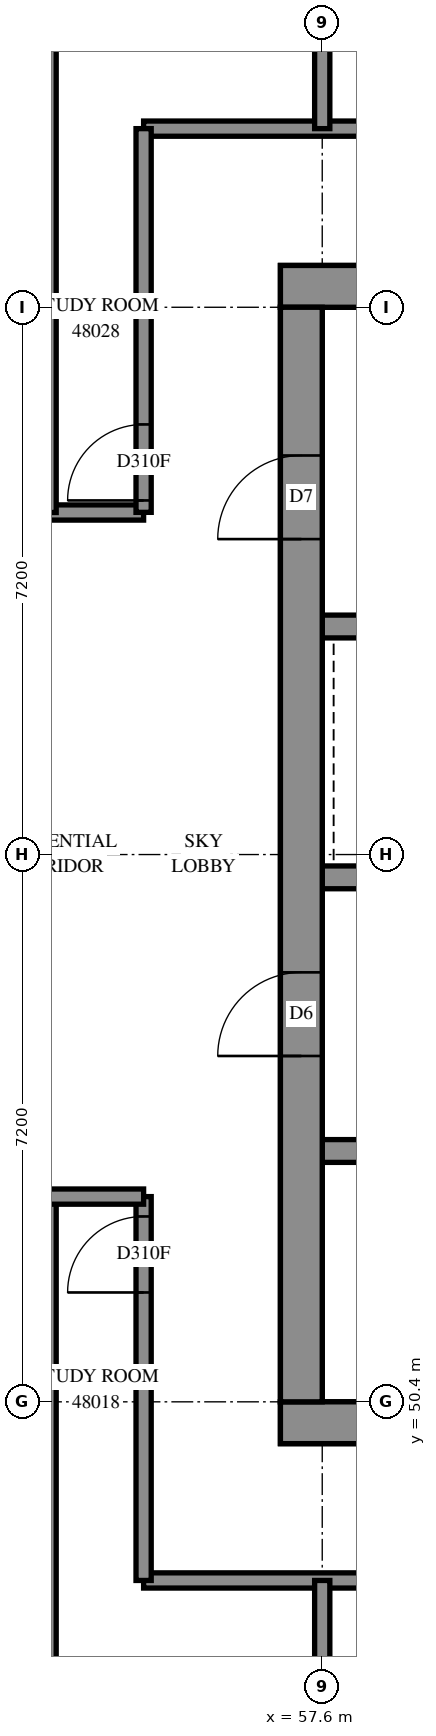
"""IFC4 building model, lengths in metres.
Left out: names, types, materials, properties, quantities, classifications, styles, units other than length and angle.
Written with IfcOpenShell. Run it as: python <this file> out.ifc"""

import sys

from ifc_helpers import new_model, si_unit, direction, frame, frame_2d, origin, place, context, subcontext, project, spatial, rectangle, extrude, element, fill, save


model = new_model("IFC4")
c1 = context("Model", 3, precision=1e-05, world=origin(), true_north=direction((0.0, 1.0)))
c2 = subcontext(c1, "Body", "Model", "MODEL_VIEW")
j1 = project(units=[si_unit("LENGTHUNIT", "METRE"), si_unit("PLANEANGLEUNIT", "RADIAN")], contexts=[c1])
p1 = place(None, origin())
s1 = spatial("IfcSite", under=j1, at=p1, CompositionType="ELEMENT")
p2 = place(p1, origin())
s2 = spatial("IfcBuilding", under=s1, at=p2, CompositionType="ELEMENT")
p3 = place(p2, frame((0.0, 0.0, 176.2)))
s3 = spatial("IfcBuildingStorey", under=s2, at=p3, CompositionType="ELEMENT", Elevation=176.2)
p4 = place(p3, frame((57.05, 50.125, -0.3), z_axis=(0.0, 0.0, 1.0), x_axis=(1.0, 0.0, 0.0)))
e1 = element("IfcWall", 1, at=p4, inside=s3, PredefinedType="SHEAR", context=c2, shape_type="SweptSolid", body=[
    extrude(rectangle(XDim=15.5, YDim=0.55, at=frame_2d((7.75, 0.0))), origin(), (0.0, 0.0, 1.0), 3.5),
])
p5 = place(p3, frame((57.05, 65.075, -0.3), z_axis=(0.0, 0.0, 1.0), x_axis=(1.0, 0.0, 0.0)))
e2 = element("IfcWall", 2, at=p5, inside=s3, PredefinedType="SHEAR", context=c2, shape_type="SweptSolid", body=[
    extrude(rectangle(XDim=15.5, YDim=0.55, at=frame_2d((7.75, 0.0))), origin(), (0.0, 0.0, 1.0), 3.5),
])
p6 = place(p5, frame((10.55, 0.0, 0.3)))
e3 = element("IfcOpeningElement", 3, at=p6, cuts=e2, PredefinedType="OPENING", context=c2, shape_type="SweptSolid", body=[
    extrude(rectangle(XDim=0.8, YDim=2.1, at=frame_2d((0.4, 1.05))), frame((0.0, 0.285, 0.0), z_axis=(0.0, -1.0, 0.0), x_axis=(1.0, 0.0, 0.0)), (0.0, 0.0, 1.0), 0.57),
])
p7 = place(p3, frame((57.325, 50.4, -0.3), z_axis=(0.0, 0.0, 1.0), x_axis=(0.0, 1.0, 0.0)))
e4 = element("IfcWall", 4, at=p7, inside=s3, PredefinedType="SHEAR", context=c2, shape_type="SweptSolid", body=[
    extrude(rectangle(XDim=14.4, YDim=0.55, at=frame_2d((7.2, 0.0))), origin(), (0.0, 0.0, 1.0), 3.5),
])
p8 = place(p7, frame((4.55, 0.0, 0.3)))
e5 = element("IfcOpeningElement", 5, at=p8, cuts=e4, PredefinedType="OPENING", context=c2, shape_type="SweptSolid", body=[
    extrude(rectangle(XDim=1.1, YDim=2.1, at=frame_2d((0.55, 1.05))), frame((0.0, 0.285, 0.0), z_axis=(0.0, -1.0, 0.0), x_axis=(1.0, 0.0, 0.0)), (0.0, 0.0, 1.0), 0.57),
])
p9 = place(p7, frame((11.35, 0.0, 0.3)))
e6 = element("IfcOpeningElement", 6, at=p9, cuts=e4, PredefinedType="OPENING", context=c2, shape_type="SweptSolid", body=[
    extrude(rectangle(XDim=1.1, YDim=2.1, at=frame_2d((0.55, 1.05))), frame((0.0, 0.285, 0.0), z_axis=(0.0, -1.0, 0.0), x_axis=(1.0, 0.0, 0.0)), (0.0, 0.0, 1.0), 0.57),
])
p10 = place(p3, frame((57.6, 53.7, 0.0), z_axis=(0.0, 0.0, 1.0), x_axis=(1.0, 0.0, 0.0)))
e7 = element("IfcWall", 7, at=p10, inside=s3, PredefinedType="SOLIDWALL", context=c2, shape_type="SweptSolid", body=[
    extrude(rectangle(XDim=14.4, YDim=0.3, at=frame_2d((7.2, 0.0))), origin(), (0.0, 0.0, 1.0), 3.9),
])
p11 = place(p10, frame((1.35, 0.0, 0.0)))
e8 = element("IfcOpeningElement", 8, at=p11, cuts=e7, PredefinedType="OPENING", context=c2, shape_type="SweptSolid", body=[
    extrude(rectangle(XDim=0.9, YDim=2.1, at=frame_2d((0.45, 1.05))), frame((0.0, 0.16, 0.0), z_axis=(0.0, -1.0, 0.0), x_axis=(1.0, 0.0, 0.0)), (0.0, 0.0, 1.0), 0.32),
])
p12 = place(p10, frame((4.95, 0.0, 0.0)))
e9 = element("IfcOpeningElement", 9, at=p12, cuts=e7, PredefinedType="OPENING", context=c2, shape_type="SweptSolid", body=[
    extrude(rectangle(XDim=0.9, YDim=2.1, at=frame_2d((0.45, 1.05))), frame((0.0, 0.16, 0.0), z_axis=(0.0, -1.0, 0.0), x_axis=(1.0, 0.0, 0.0)), (0.0, 0.0, 1.0), 0.32),
])
p13 = place(p10, frame((8.55, 0.0, 0.0)))
e10 = element("IfcOpeningElement", 10, at=p13, cuts=e7, PredefinedType="OPENING", context=c2, shape_type="SweptSolid", body=[
    extrude(rectangle(XDim=0.9, YDim=2.1, at=frame_2d((0.45, 1.05))), frame((0.0, 0.16, 0.0), z_axis=(0.0, -1.0, 0.0), x_axis=(1.0, 0.0, 0.0)), (0.0, 0.0, 1.0), 0.32),
])
p14 = place(p10, frame((12.05, 0.0, 0.0)))
e11 = element("IfcOpeningElement", 11, at=p14, cuts=e7, PredefinedType="OPENING", context=c2, shape_type="SweptSolid", body=[
    extrude(rectangle(XDim=1.1, YDim=2.1, at=frame_2d((0.55, 1.05))), frame((0.0, 0.16, 0.0), z_axis=(0.0, -1.0, 0.0), x_axis=(1.0, 0.0, 0.0)), (0.0, 0.0, 1.0), 0.32),
])
p15 = place(p3, frame((57.6, 57.3, 0.0), z_axis=(0.0, 0.0, 1.0), x_axis=(1.0, 0.0, 0.0)))
e12 = element("IfcWall", 12, at=p15, inside=s3, PredefinedType="SOLIDWALL", context=c2, shape_type="SweptSolid", body=[
    extrude(rectangle(XDim=14.4, YDim=0.3, at=frame_2d((7.2, 0.0))), origin(), (0.0, 0.0, 1.0), 3.9),
])
p16 = place(p15, frame((1.25, 0.0, 0.0)))
e13 = element("IfcOpeningElement", 13, at=p16, cuts=e12, PredefinedType="OPENING", context=c2, shape_type="SweptSolid", body=[
    extrude(rectangle(XDim=1.1, YDim=2.1, at=frame_2d((0.55, 1.05))), frame((0.0, 0.16, 0.0), z_axis=(0.0, -1.0, 0.0), x_axis=(1.0, 0.0, 0.0)), (0.0, 0.0, 1.0), 0.32),
])
p17 = place(p15, frame((4.85, 0.0, 0.0)))
e14 = element("IfcOpeningElement", 14, at=p17, cuts=e12, PredefinedType="OPENING", context=c2, shape_type="SweptSolid", body=[
    extrude(rectangle(XDim=1.1, YDim=2.1, at=frame_2d((0.55, 1.05))), frame((0.0, 0.16, 0.0), z_axis=(0.0, -1.0, 0.0), x_axis=(1.0, 0.0, 0.0)), (0.0, 0.0, 1.0), 0.32),
])
p18 = place(p15, frame((8.45, 0.0, 0.0)))
e15 = element("IfcOpeningElement", 15, at=p18, cuts=e12, PredefinedType="OPENING", context=c2, shape_type="SweptSolid", body=[
    extrude(rectangle(XDim=1.1, YDim=2.1, at=frame_2d((0.55, 1.05))), frame((0.0, 0.16, 0.0), z_axis=(0.0, -1.0, 0.0), x_axis=(1.0, 0.0, 0.0)), (0.0, 0.0, 1.0), 0.32),
])
p19 = place(p15, frame((12.05, 0.0, 0.0)))
e16 = element("IfcOpeningElement", 16, at=p19, cuts=e12, PredefinedType="OPENING", context=c2, shape_type="SweptSolid", body=[
    extrude(rectangle(XDim=1.1, YDim=2.1, at=frame_2d((0.55, 1.05))), frame((0.0, 0.16, 0.0), z_axis=(0.0, -1.0, 0.0), x_axis=(1.0, 0.0, 0.0)), (0.0, 0.0, 1.0), 0.32),
])
p20 = place(p3, frame((57.6, 60.6, 0.0), z_axis=(0.0, 0.0, 1.0), x_axis=(1.0, 0.0, 0.0)))
e17 = element("IfcWall", 17, at=p20, inside=s3, PredefinedType="SOLIDWALL", context=c2, shape_type="SweptSolid", body=[
    extrude(rectangle(XDim=7.2, YDim=0.3, at=frame_2d((3.6, 0.0))), origin(), (0.0, 0.0, 1.0), 3.9),
])
p21 = place(p3, frame((55.25, 48.05, 0.0), z_axis=(0.0, 0.0, 1.0), x_axis=(1.0, 0.0, 0.0)))
e18 = element("IfcWall", 18, at=p21, inside=s3, PredefinedType="PARTITIONING", context=c2, shape_type="SweptSolid", body=[
    extrude(rectangle(XDim=19.12, YDim=0.2, at=frame_2d((9.56, 0.0))), origin(), (0.0, 0.0, 1.0), 3.9),
])
p22 = place(p21, frame((4.383, 0.0, 0.0)))
e19 = element("IfcOpeningElement", 19, at=p22, cuts=e18, PredefinedType="OPENING", context=c2, shape_type="SweptSolid", body=[
    extrude(rectangle(XDim=1.0, YDim=2.1, at=frame_2d((0.5, 1.05))), frame((0.0, 0.11, 0.0), z_axis=(0.0, -1.0, 0.0), x_axis=(1.0, 0.0, 0.0)), (0.0, 0.0, 1.0), 0.22),
])
p23 = place(p21, frame((6.457, 0.0, 0.0)))
e20 = element("IfcOpeningElement", 20, at=p23, cuts=e18, PredefinedType="OPENING", context=c2, shape_type="SweptSolid", body=[
    extrude(rectangle(XDim=1.0, YDim=2.1, at=frame_2d((0.5, 1.05))), frame((0.0, 0.11, 0.0), z_axis=(0.0, -1.0, 0.0), x_axis=(1.0, 0.0, 0.0)), (0.0, 0.0, 1.0), 0.22),
])
p24 = place(p21, frame((11.582, 0.0, 0.0)))
e21 = element("IfcOpeningElement", 21, at=p24, cuts=e18, PredefinedType="OPENING", context=c2, shape_type="SweptSolid", body=[
    extrude(rectangle(XDim=1.0, YDim=2.1, at=frame_2d((0.5, 1.05))), frame((0.0, 0.11, 0.0), z_axis=(0.0, -1.0, 0.0), x_axis=(1.0, 0.0, 0.0)), (0.0, 0.0, 1.0), 0.22),
])
p25 = place(p21, frame((13.658, 0.0, 0.0)))
e22 = element("IfcOpeningElement", 22, at=p25, cuts=e18, PredefinedType="OPENING", context=c2, shape_type="SweptSolid", body=[
    extrude(rectangle(XDim=1.0, YDim=2.1, at=frame_2d((0.5, 1.05))), frame((0.0, 0.11, 0.0), z_axis=(0.0, -1.0, 0.0), x_axis=(1.0, 0.0, 0.0)), (0.0, 0.0, 1.0), 0.22),
])
p26 = place(p3, frame((55.25, 67.15, 0.0), z_axis=(0.0, 0.0, 1.0), x_axis=(1.0, 0.0, 0.0)))
e23 = element("IfcWall", 23, at=p26, inside=s3, PredefinedType="PARTITIONING", context=c2, shape_type="SweptSolid", body=[
    extrude(rectangle(XDim=19.1, YDim=0.2, at=frame_2d((9.55, 0.0))), origin(), (0.0, 0.0, 1.0), 3.9),
])
p27 = place(p26, frame((4.442, 0.0, 0.0)))
e24 = element("IfcOpeningElement", 24, at=p27, cuts=e23, PredefinedType="OPENING", context=c2, shape_type="SweptSolid", body=[
    extrude(rectangle(XDim=1.0, YDim=2.1, at=frame_2d((0.5, 1.05))), frame((0.0, 0.11, 0.0), z_axis=(0.0, -1.0, 0.0), x_axis=(1.0, 0.0, 0.0)), (0.0, 0.0, 1.0), 0.22),
])
p28 = place(p26, frame((6.518, 0.0, 0.0)))
e25 = element("IfcOpeningElement", 25, at=p28, cuts=e23, PredefinedType="OPENING", context=c2, shape_type="SweptSolid", body=[
    extrude(rectangle(XDim=1.0, YDim=2.1, at=frame_2d((0.5, 1.05))), frame((0.0, 0.11, 0.0), z_axis=(0.0, -1.0, 0.0), x_axis=(1.0, 0.0, 0.0)), (0.0, 0.0, 1.0), 0.22),
])
p29 = place(p26, frame((11.643, 0.0, 0.0)))
e26 = element("IfcOpeningElement", 26, at=p29, cuts=e23, PredefinedType="OPENING", context=c2, shape_type="SweptSolid", body=[
    extrude(rectangle(XDim=1.0, YDim=2.1, at=frame_2d((0.5, 1.05))), frame((0.0, 0.11, 0.0), z_axis=(0.0, -1.0, 0.0), x_axis=(1.0, 0.0, 0.0)), (0.0, 0.0, 1.0), 0.22),
])
p30 = place(p26, frame((13.717, 0.0, 0.0)))
e27 = element("IfcOpeningElement", 27, at=p30, cuts=e23, PredefinedType="OPENING", context=c2, shape_type="SweptSolid", body=[
    extrude(rectangle(XDim=1.0, YDim=2.1, at=frame_2d((0.5, 1.05))), frame((0.0, 0.11, 0.0), z_axis=(0.0, -1.0, 0.0), x_axis=(1.0, 0.0, 0.0)), (0.0, 0.0, 1.0), 0.22),
])
p31 = place(p3, frame((40.502, 62.1, 0.0), z_axis=(0.0, 0.0, 1.0), x_axis=(1.0, 0.0, 0.0)))
e28 = element("IfcWall", 28, at=p31, inside=s3, PredefinedType="PARTITIONING", context=c2, shape_type="SweptSolid", body=[
    extrude(rectangle(XDim=14.748, YDim=0.2, at=frame_2d((7.374, 0.0))), origin(), (0.0, 0.0, 1.0), 3.9),
])
p32 = place(p31, frame((0.265, 0.0, 0.0)))
e29 = element("IfcOpeningElement", 29, at=p32, cuts=e28, PredefinedType="OPENING", context=c2, shape_type="SweptSolid", body=[
    extrude(rectangle(XDim=1.0, YDim=2.1, at=frame_2d((0.5, 1.05))), frame((0.0, 0.11, 0.0), z_axis=(0.0, -1.0, 0.0), x_axis=(1.0, 0.0, 0.0)), (0.0, 0.0, 1.0), 0.22),
])
p33 = place(p31, frame((6.561, 0.0, 0.0)))
e30 = element("IfcOpeningElement", 30, at=p33, cuts=e28, PredefinedType="OPENING", context=c2, shape_type="SweptSolid", body=[
    extrude(rectangle(XDim=1.0, YDim=2.1, at=frame_2d((0.5, 1.05))), frame((0.0, 0.11, 0.0), z_axis=(0.0, -1.0, 0.0), x_axis=(1.0, 0.0, 0.0)), (0.0, 0.0, 1.0), 0.22),
])
p34 = place(p31, frame((11.991, 0.0, 0.0)))
e31 = element("IfcOpeningElement", 31, at=p34, cuts=e28, PredefinedType="OPENING", context=c2, shape_type="SweptSolid", body=[
    extrude(rectangle(XDim=1.0, YDim=2.1, at=frame_2d((0.5, 1.05))), frame((0.0, 0.11, 0.0), z_axis=(0.0, -1.0, 0.0), x_axis=(1.0, 0.0, 0.0)), (0.0, 0.0, 1.0), 0.22),
])
for number, where, z_axis, x_axis in (
    (32, (54.0, 45.13, 0.0), (0.0, 0.0, 1.0), (0.0, 1.0, 0.0)),
    (33, (54.0, 62.1, 0.0), (0.0, 0.0, 1.0), (0.0, 1.0, 0.0)),
):
    element("IfcWall", number, at=place(p3, frame(where, z_axis=z_axis, x_axis=x_axis)), inside=s3, PredefinedType="PARTITIONING", context=c2, shape_type="SweptSolid", body=[
        extrude(rectangle(XDim=7.97, YDim=0.2, at=frame_2d((3.985, 0.0))), origin(), (0.0, 0.0, 1.0), 3.9),
    ])
p35 = place(p3, frame((55.25, 48.05, 0.0), z_axis=(0.0, 0.0, 1.0), x_axis=(0.0, 1.0, 0.0)))
e34 = element("IfcWall", 34, at=p35, inside=s3, PredefinedType="PARTITIONING", context=c2, shape_type="SweptSolid", body=[
    extrude(rectangle(XDim=5.05, YDim=0.2, at=frame_2d((2.525, 0.0))), origin(), (0.0, 0.0, 1.0), 3.9),
])
p36 = place(p35, frame((3.789, 0.0, 0.0)))
e35 = element("IfcOpeningElement", 35, at=p36, cuts=e34, PredefinedType="OPENING", context=c2, shape_type="SweptSolid", body=[
    extrude(rectangle(XDim=1.0, YDim=2.1, at=frame_2d((0.5, 1.05))), frame((0.0, 0.11, 0.0), z_axis=(0.0, -1.0, 0.0), x_axis=(1.0, 0.0, 0.0)), (0.0, 0.0, 1.0), 0.22),
])
p37 = place(p3, frame((55.25, 62.102, 0.0), z_axis=(0.0, 0.0, 1.0), x_axis=(0.0, 1.0, 0.0)))
e36 = element("IfcWall", 36, at=p37, inside=s3, PredefinedType="PARTITIONING", context=c2, shape_type="SweptSolid", body=[
    extrude(rectangle(XDim=5.048, YDim=0.2, at=frame_2d((2.524, 0.0))), origin(), (0.0, 0.0, 1.0), 3.9),
])
p38 = place(p37, frame((0.157, 0.0, 0.0)))
e37 = element("IfcOpeningElement", 37, at=p38, cuts=e36, PredefinedType="OPENING", context=c2, shape_type="SweptSolid", body=[
    extrude(rectangle(XDim=1.0, YDim=2.1, at=frame_2d((0.5, 1.05))), frame((0.0, 0.11, 0.0), z_axis=(0.0, -1.0, 0.0), x_axis=(1.0, 0.0, 0.0)), (0.0, 0.0, 1.0), 0.22),
])
p39 = place(p3, frame((50.4, 53.1, 0.0), z_axis=(0.0, 0.0, 1.0), x_axis=(1.0, 0.0, 0.0)))
e38 = element("IfcWall", 38, at=p39, inside=s3, PredefinedType="PARTITIONING", context=c2, shape_type="SweptSolid", body=[
    extrude(rectangle(XDim=4.85, YDim=0.2, at=frame_2d((2.425, 0.0))), origin(), (0.0, 0.0, 1.0), 3.9),
])
p40 = place(p39, frame((2.033, 0.0, 0.0)))
e39 = element("IfcOpeningElement", 39, at=p40, cuts=e38, PredefinedType="OPENING", context=c2, shape_type="SweptSolid", body=[
    extrude(rectangle(XDim=1.0, YDim=2.1, at=frame_2d((0.5, 1.05))), frame((0.0, 0.11, 0.0), z_axis=(0.0, -1.0, 0.0), x_axis=(1.0, 0.0, 0.0)), (0.0, 0.0, 1.0), 0.22),
])
for number, where, z_axis, x_axis in (
    (40, (57.6, 45.13, 0.0), (0.0, 0.0, 1.0), (0.0, 1.0, 0.0)),
    (41, (57.6, 67.15, 0.0), (0.0, 0.0, 1.0), (0.0, 1.0, 0.0)),
):
    element("IfcWall", number, at=place(p3, frame(where, z_axis=z_axis, x_axis=x_axis)), inside=s3, PredefinedType="PARTITIONING", context=c2, shape_type="SweptSolid", body=[
        extrude(rectangle(XDim=2.92, YDim=0.2, at=frame_2d((1.46, 0.0))), origin(), (0.0, 0.0, 1.0), 3.9),
    ])
p41 = place(p8, origin())
e42 = element("IfcDoor", 42, at=p41, inside=s3, OperationType="DOUBLE_DOOR_SINGLE_SWING", PredefinedType="DOOR", context=c2, shape_type="SweptSolid", body=[
    extrude(rectangle(XDim=1.1, YDim=2.1, at=frame_2d((0.55, 1.05))), frame((0.0, 0.025, 0.0), z_axis=(0.0, -1.0, 0.0), x_axis=(1.0, 0.0, 0.0)), (0.0, 0.0, 1.0), 0.05),
])
fill(e5, e42)
p42 = place(p9, origin())
e43 = element("IfcDoor", 43, at=p42, inside=s3, OperationType="SINGLE_SWING_LEFT", PredefinedType="DOOR", context=c2, shape_type="SweptSolid", body=[
    extrude(rectangle(XDim=1.1, YDim=2.1, at=frame_2d((0.55, 1.05))), frame((0.0, 0.025, 0.0), z_axis=(0.0, -1.0, 0.0), x_axis=(1.0, 0.0, 0.0)), (0.0, 0.0, 1.0), 0.05),
])
fill(e6, e43)
p43 = place(p36, origin())
e44 = element("IfcDoor", 44, at=p43, inside=s3, OperationType="SINGLE_SWING_RIGHT", PredefinedType="DOOR", context=c2, shape_type="SweptSolid", body=[
    extrude(rectangle(XDim=1.0, YDim=2.1, at=frame_2d((0.5, 1.05))), frame((0.0, 0.025, 0.0), z_axis=(0.0, -1.0, 0.0), x_axis=(1.0, 0.0, 0.0)), (0.0, 0.0, 1.0), 0.05),
])
fill(e35, e44)
p44 = place(p38, origin())
e45 = element("IfcDoor", 45, at=p44, inside=s3, OperationType="SINGLE_SWING_LEFT", PredefinedType="DOOR", context=c2, shape_type="SweptSolid", body=[
    extrude(rectangle(XDim=1.0, YDim=2.1, at=frame_2d((0.5, 1.05))), frame((0.0, 0.025, 0.0), z_axis=(0.0, -1.0, 0.0), x_axis=(1.0, 0.0, 0.0)), (0.0, 0.0, 1.0), 0.05),
])
fill(e37, e45)
save(model, sys.argv[1])
